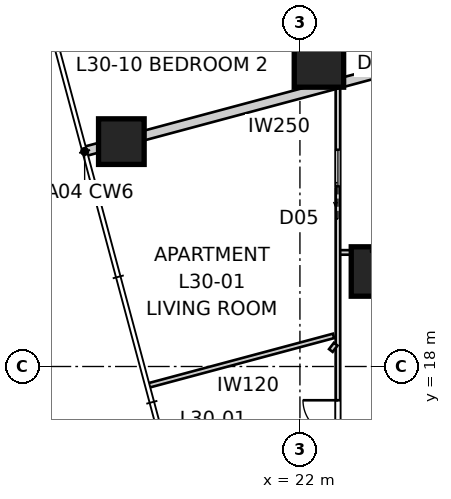
"""IFC4 building model, lengths in metres.
Left out: names, types, materials, properties, quantities, classifications, styles, units other than length and angle.
Written with IfcOpenShell. Run it as: python <this file> out.ifc"""

import sys

from ifc_helpers import new_model, si_unit, direction, frame, frame_2d, origin, origin_2d, place, context, subcontext, project, spatial, rectangle, extrude, element, fill, save


model = new_model("IFC4")
c1 = context("Model", 3, precision=1e-05, world=origin(), true_north=direction((0.0, 1.0)))
c2 = subcontext(c1, "Body", "Model", "MODEL_VIEW")
j1 = project(units=[si_unit("LENGTHUNIT", "METRE"), si_unit("PLANEANGLEUNIT", "RADIAN")], contexts=[c1])
p1 = place(None, origin())
s1 = spatial("IfcSite", under=j1, at=p1, CompositionType="ELEMENT")
p2 = place(p1, origin())
s2 = spatial("IfcBuilding", under=s1, at=p2, CompositionType="ELEMENT")
p3 = place(p2, frame((0.0, 0.0, 111.6)))
s3 = spatial("IfcBuildingStorey", under=s2, at=p3, CompositionType="ELEMENT", Elevation=111.6)
p4 = place(p3, frame((17.301, 23.918, -0.15), z_axis=(0.0, 0.0, 1.0), x_axis=(1.0, 0.0, 0.0)))
e1 = element("IfcColumn", 1, at=p4, inside=s3, PredefinedType="COLUMN", context=c2, shape_type="SweptSolid", body=[
    extrude(rectangle(XDim=1.2, YDim=1.2, at=origin_2d()), origin(), (0.0, 0.0, 1.0), 3.55),
])
for number, where, z_axis, x_axis in (
    (2, (22.5, 26.0, 0.0), (0.0, 0.0, 1.0), (1.0, 0.0, 0.0)),
    (3, (24.0, 20.5, 0.0), (0.0, 0.0, 1.0), (1.0, 0.0, 0.0)),
):
    element("IfcColumn", number, at=place(p3, frame(where, z_axis=z_axis, x_axis=x_axis)), inside=s3, PredefinedType="COLUMN", context=c2, shape_type="SweptSolid", body=[
        extrude(rectangle(XDim=1.3, YDim=1.3, at=origin_2d()), origin(), (0.0, 0.0, 1.0), 3.4),
    ])
p5 = place(p3, frame((16.335, 23.659, 0.0), z_axis=(0.0, 0.0, 1.0), x_axis=(0.965927365002, 0.258813302479, 0.0)))
e4 = element("IfcWall", 4, at=p5, inside=s3, PredefinedType="PARTITIONING", context=c2, shape_type="SweptSolid", body=[
    extrude(rectangle(XDim=10.22, YDim=0.25, at=frame_2d((5.11, 0.0))), origin(), (0.0, 0.0, 1.0), 3.25),
])
p6 = place(p3, frame((23.0, 21.002, 0.0), z_axis=(0.0, 0.0, 1.0), x_axis=(1.0, 0.0, 0.0)))
e5 = element("IfcWall", 5, at=p6, inside=s3, PredefinedType="PARTITIONING", context=c2, shape_type="SweptSolid", body=[
    extrude(rectangle(XDim=3.2, YDim=0.12, at=frame_2d((1.6, 0.0))), origin(), (0.0, 0.0, 1.0), 3.25),
])
p7 = place(p6, frame((1.72, 0.0, 0.0)))
e6 = element("IfcOpeningElement", 6, at=p7, cuts=e5, PredefinedType="OPENING", context=c2, shape_type="SweptSolid", body=[
    extrude(rectangle(XDim=0.96, YDim=2.1, at=frame_2d((0.48, 1.05))), frame((0.0, 0.07, 0.0), z_axis=(0.0, -1.0, 0.0), x_axis=(1.0, 0.0, 0.0)), (0.0, 0.0, 1.0), 0.14),
])
p8 = place(p3, frame((23.0, 13.0, 0.0), z_axis=(0.0, 0.0, 1.0), x_axis=(0.0, 1.0, 0.0)))
e7 = element("IfcWall", 7, at=p8, inside=s3, PredefinedType="PARTITIONING", context=c2, shape_type="SweptSolid", body=[
    extrude(rectangle(XDim=27.64, YDim=0.12, at=frame_2d((13.82, 0.0))), origin(), (0.0, 0.0, 1.0), 2.55),
])
p9 = place(p8, frame((3.192, 0.0, 0.0)))
e8 = element("IfcOpeningElement", 8, at=p9, cuts=e7, PredefinedType="OPENING", context=c2, shape_type="SweptSolid", body=[
    extrude(rectangle(XDim=0.92, YDim=2.34, at=frame_2d((0.46, 1.17))), frame((0.0, 0.07, 0.0), z_axis=(0.0, -1.0, 0.0), x_axis=(1.0, 0.0, 0.0)), (0.0, 0.0, 1.0), 0.14),
])
p10 = place(p8, frame((13.779, 0.0, 0.0)))
e9 = element("IfcOpeningElement", 9, at=p10, cuts=e7, PredefinedType="OPENING", context=c2, shape_type="SweptSolid", body=[
    extrude(rectangle(XDim=0.92, YDim=2.34, at=frame_2d((0.46, 1.17))), frame((0.0, 0.07, 0.0), z_axis=(0.0, -1.0, 0.0), x_axis=(1.0, 0.0, 0.0)), (0.0, 0.0, 1.0), 0.14),
])
p11 = place(p8, frame((16.374, 0.0, 0.0)))
e10 = element("IfcOpeningElement", 10, at=p11, cuts=e7, PredefinedType="OPENING", context=c2, shape_type="SweptSolid", body=[
    extrude(rectangle(XDim=0.92, YDim=2.34, at=frame_2d((0.46, 1.17))), frame((0.0, 0.07, 0.0), z_axis=(0.0, -1.0, 0.0), x_axis=(1.0, 0.0, 0.0)), (0.0, 0.0, 1.0), 0.14),
])
p12 = place(p8, frame((9.743, 0.0, 0.0)))
e11 = element("IfcOpeningElement", 11, at=p12, cuts=e7, PredefinedType="OPENING", context=c2, shape_type="SweptSolid", body=[
    extrude(rectangle(XDim=0.96, YDim=2.1, at=frame_2d((0.48, 1.05))), frame((0.0, 0.07, 0.0), z_axis=(0.0, -1.0, 0.0), x_axis=(1.0, 0.0, 0.0)), (0.0, 0.0, 1.0), 0.14),
])
p13 = place(p8, frame((24.879, 0.0, 0.0)))
e12 = element("IfcOpeningElement", 12, at=p13, cuts=e7, PredefinedType="OPENING", context=c2, shape_type="SweptSolid", body=[
    extrude(rectangle(XDim=0.96, YDim=2.1, at=frame_2d((0.48, 1.05))), frame((0.0, 0.07, 0.0), z_axis=(0.0, -1.0, 0.0), x_axis=(1.0, 0.0, 0.0)), (0.0, 0.0, 1.0), 0.14),
])
p14 = place(p3, frame((22.813, 18.42, 0.0), z_axis=(0.0, 0.0, 1.0), x_axis=(0.609039064162, 0.793140226142, 0.0)))
e13 = element("IfcWall", 13, at=p14, inside=s3, PredefinedType="PARTITIONING", context=c2, shape_type="SweptSolid", body=[
    extrude(rectangle(XDim=0.211, YDim=0.12, at=frame_2d((0.105, 0.0))), origin(), (0.0, 0.0, 1.0), 3.25),
])
p15 = place(p3, frame((22.884, 18.805, 0.0), z_axis=(0.0, 0.0, 1.0), x_axis=(-0.965921615375, -0.258834759935, 0.0)))
e14 = element("IfcWall", 14, at=p15, inside=s3, PredefinedType="PARTITIONING", context=c2, shape_type="SweptSolid", body=[
    extrude(rectangle(XDim=5.029, YDim=0.12, at=frame_2d((2.515, 0.0))), origin(), (0.0, 0.0, 1.0), 2.722),
])
p16 = place(p9, origin())
e15 = element("IfcDoor", 15, at=p16, inside=s3, OperationType="SINGLE_SWING_RIGHT", PredefinedType="DOOR", context=c2, shape_type="SweptSolid", body=[
    extrude(rectangle(XDim=0.92, YDim=2.34, at=frame_2d((0.46, 1.17))), frame((0.0, 0.025, 0.0), z_axis=(0.0, -1.0, 0.0), x_axis=(1.0, 0.0, 0.0)), (0.0, 0.0, 1.0), 0.05),
])
fill(e8, e15)
p17 = place(p12, origin())
e16 = element("IfcDoor", 16, at=p17, inside=s3, OperationType="SLIDING_TO_LEFT", PredefinedType="DOOR", context=c2, shape_type="SweptSolid", body=[
    extrude(rectangle(XDim=0.96, YDim=2.1, at=frame_2d((0.48, 1.05))), frame((0.0, 0.025, 0.0), z_axis=(0.0, -1.0, 0.0), x_axis=(1.0, 0.0, 0.0)), (0.0, 0.0, 1.0), 0.05),
])
fill(e11, e16)
save(model, sys.argv[1])
